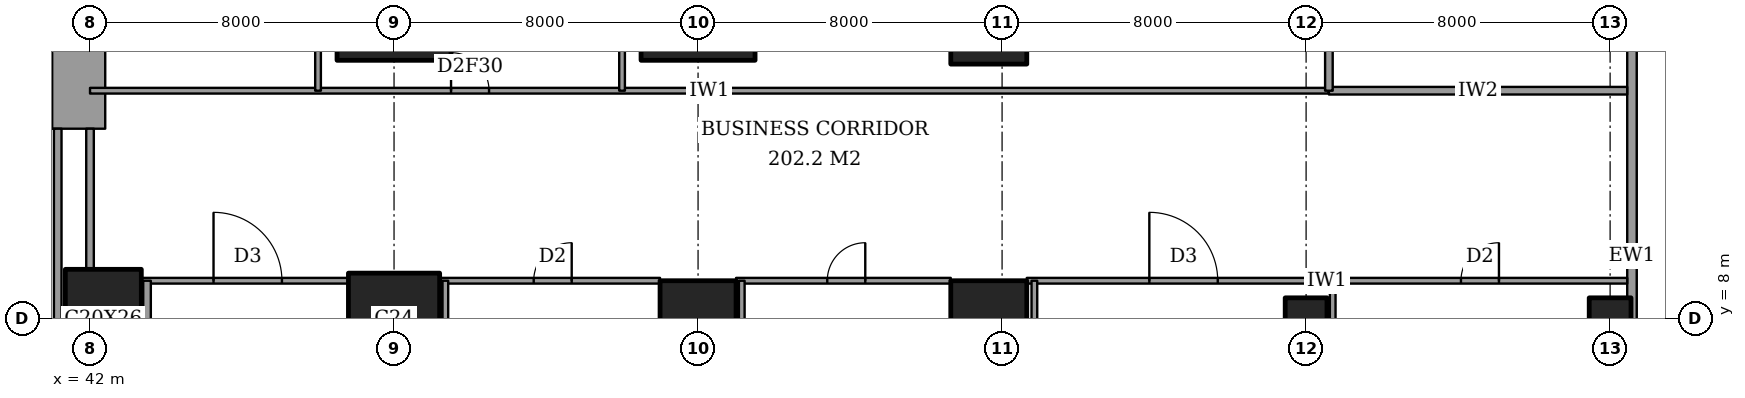
"""IFC4 building model, lengths in metres.
Left out: names, types, materials, properties, quantities, classifications, styles, units other than length and angle.
Written with IfcOpenShell. Run it as: python <this file> out.ifc"""

import sys

from ifc_helpers import new_model, si_unit, direction, frame, frame_2d, origin, origin_2d, place, context, subcontext, project, spatial, rectangle, extrude, element, fill, save


model = new_model("IFC4")
c1 = context("Model", 3, precision=1e-05, world=origin(), true_north=direction((0.0, 1.0)))
c2 = subcontext(c1, "Body", "Model", "MODEL_VIEW")
j1 = project(units=[si_unit("LENGTHUNIT", "METRE"), si_unit("PLANEANGLEUNIT", "RADIAN")], contexts=[c1])
p1 = place(None, origin())
s1 = spatial("IfcSite", under=j1, at=p1, CompositionType="ELEMENT")
p2 = place(p1, origin())
s2 = spatial("IfcBuilding", under=s1, at=p2, CompositionType="ELEMENT")
p3 = place(p2, frame((0.0, 0.0, 6.0)))
s3 = spatial("IfcBuildingStorey", under=s2, at=p3, CompositionType="ELEMENT", Elevation=6.0)
p4 = place(p3, frame((42.35, 8.0, 0.0), z_axis=(0.0, 0.0, 1.0), x_axis=(1.0, 0.0, 0.0)))
e1 = element("IfcColumn", 1, at=p4, inside=s3, PredefinedType="COLUMN", context=c2, shape_type="SweptSolid", body=[
    extrude(rectangle(XDim=2.0, YDim=2.6, at=origin_2d()), origin(), (0.0, 0.0, 1.0), 5.0),
])
p5 = place(p3, frame((50.0, 8.0, 0.0), z_axis=(0.0, 0.0, 1.0), x_axis=(1.0, 0.0, 0.0)))
e2 = element("IfcColumn", 2, at=p5, inside=s3, PredefinedType="COLUMN", context=c2, shape_type="SweptSolid", body=[
    extrude(rectangle(XDim=2.4, YDim=2.4, at=origin_2d()), origin(), (0.0, 0.0, 1.0), 5.0),
])
p6 = place(p3, frame((50.0, 16.0, 0.0), z_axis=(0.0, 0.0, 1.0), x_axis=(1.0, 0.0, 0.0)))
e3 = element("IfcColumn", 3, at=p6, inside=s3, PredefinedType="COLUMN", context=c2, shape_type="SweptSolid", body=[
    extrude(rectangle(XDim=3.0, YDim=2.4, at=origin_2d()), origin(), (0.0, 0.0, 1.0), 5.0),
])
p7 = place(p3, frame((58.0, 8.0, 0.0), z_axis=(0.0, 0.0, 1.0), x_axis=(1.0, 0.0, 0.0)))
e4 = element("IfcColumn", 4, at=p7, inside=s3, PredefinedType="COLUMN", context=c2, shape_type="SweptSolid", body=[
    extrude(rectangle(XDim=2.0, YDim=2.0, at=origin_2d()), origin(), (0.0, 0.0, 1.0), 5.0),
])
p8 = place(p3, frame((58.0, 16.0, 0.0), z_axis=(0.0, 0.0, 1.0), x_axis=(1.0, 0.0, 0.0)))
e5 = element("IfcColumn", 5, at=p8, inside=s3, PredefinedType="COLUMN", context=c2, shape_type="SweptSolid", body=[
    extrude(rectangle(XDim=3.0, YDim=2.4, at=origin_2d()), origin(), (0.0, 0.0, 1.0), 5.0),
])
p9 = place(p3, frame((65.65, 8.0, 0.0), z_axis=(0.0, 0.0, 1.0), x_axis=(1.0, 0.0, 0.0)))
e6 = element("IfcColumn", 6, at=p9, inside=s3, PredefinedType="COLUMN", context=c2, shape_type="SweptSolid", body=[
    extrude(rectangle(XDim=2.0, YDim=2.0, at=origin_2d()), origin(), (0.0, 0.0, 1.0), 5.0),
])
p10 = place(p3, frame((65.65, 16.0, 0.0), z_axis=(0.0, 0.0, 1.0), x_axis=(0.0, 1.0, 0.0)))
e7 = element("IfcColumn", 7, at=p10, inside=s3, PredefinedType="COLUMN", context=c2, shape_type="SweptSolid", body=[
    extrude(rectangle(XDim=2.6, YDim=2.0, at=origin_2d()), origin(), (0.0, 0.0, 1.0), 5.0),
])
for number, where, z_axis, x_axis in (
    (8, (74.0, 8.0, 0.0), (0.0, 0.0, 1.0), (1.0, 0.0, 0.0)),
    (9, (82.0, 8.0, 0.0), (0.0, 0.0, 1.0), (1.0, 0.0, 0.0)),
):
    element("IfcColumn", number, at=place(p3, frame(where, z_axis=z_axis, x_axis=x_axis)), inside=s3, PredefinedType="COLUMN", context=c2, shape_type="SweptSolid", body=[
        extrude(rectangle(XDim=1.1, YDim=1.1, at=origin_2d()), origin(), (0.0, 0.0, 1.0), 5.0),
    ])
p11 = place(p3, frame((41.7, 13.0, 0.0), z_axis=(0.0, 0.0, 1.0), x_axis=(0.0, 1.0, 0.0)))
e10 = element("IfcWall", 10, at=p11, inside=s3, PredefinedType="SHEAR", context=c2, shape_type="SweptSolid", body=[
    extrude(rectangle(XDim=11.85, YDim=1.4, at=frame_2d((5.925, 0.0))), origin(), (0.0, 0.0, 1.0), 5.0),
])
p12 = place(p11, frame((7.5, 0.0, 0.0)))
e11 = element("IfcOpeningElement", 11, at=p12, cuts=e10, PredefinedType="OPENING", context=c2, shape_type="SweptSolid", body=[
    extrude(rectangle(XDim=1.8, YDim=2.4, at=frame_2d((0.9, 1.2))), frame((0.0, 0.71, 0.0), z_axis=(0.0, -1.0, 0.0), x_axis=(1.0, 0.0, 0.0)), (0.0, 0.0, 1.0), 1.42),
])
p13 = place(p3, frame((82.575, -16.575, 0.0), z_axis=(0.0, 0.0, 1.0), x_axis=(0.0, 1.0, 0.0)))
e12 = element("IfcWall", 12, at=p13, inside=s3, PredefinedType="SOLIDWALL", context=c2, shape_type="SweptSolid", body=[
    extrude(rectangle(XDim=52.45, YDim=0.25, at=frame_2d((26.225, 0.0))), origin(), (0.0, 0.0, 1.0), 5.0),
])
p14 = place(p3, frame((43.35, 9.0, 0.0), z_axis=(0.0, 0.0, 1.0), x_axis=(1.0, 0.0, 0.0)))
e13 = element("IfcWall", 13, at=p14, inside=s3, PredefinedType="PARTITIONING", context=c2, shape_type="SweptSolid", body=[
    extrude(rectangle(XDim=5.45, YDim=0.15, at=frame_2d((2.725, 0.0))), origin(), (0.0, 0.0, 1.0), 4.7),
])
p15 = place(p14, frame((1.9, 0.0, 0.0)))
e14 = element("IfcOpeningElement", 14, at=p15, cuts=e13, PredefinedType="OPENING", context=c2, shape_type="SweptSolid", body=[
    extrude(rectangle(XDim=1.8, YDim=2.1, at=frame_2d((0.9, 1.05))), frame((0.0, 0.085, 0.0), z_axis=(0.0, -1.0, 0.0), x_axis=(1.0, 0.0, 0.0)), (0.0, 0.0, 1.0), 0.17),
])
p16 = place(p3, frame((51.2, 9.0, 0.0), z_axis=(0.0, 0.0, 1.0), x_axis=(1.0, 0.0, 0.0)))
e15 = element("IfcWall", 15, at=p16, inside=s3, PredefinedType="PARTITIONING", context=c2, shape_type="SweptSolid", body=[
    extrude(rectangle(XDim=5.8, YDim=0.15, at=frame_2d((2.9, 0.0))), origin(), (0.0, 0.0, 1.0), 4.7),
])
p17 = place(p16, frame((2.475, 0.0, 0.0)))
e16 = element("IfcOpeningElement", 16, at=p17, cuts=e15, PredefinedType="OPENING", context=c2, shape_type="SweptSolid", body=[
    extrude(rectangle(XDim=1.0, YDim=2.1, at=frame_2d((0.5, 1.05))), frame((0.0, 0.085, 0.0), z_axis=(0.0, -1.0, 0.0), x_axis=(1.0, 0.0, 0.0)), (0.0, 0.0, 1.0), 0.17),
])
p18 = place(p3, frame((59.0, 9.0, 0.0), z_axis=(0.0, 0.0, 1.0), x_axis=(1.0, 0.0, 0.0)))
e17 = element("IfcWall", 17, at=p18, inside=s3, PredefinedType="PARTITIONING", context=c2, shape_type="SweptSolid", body=[
    extrude(rectangle(XDim=5.65, YDim=0.15, at=frame_2d((2.825, 0.0))), origin(), (0.0, 0.0, 1.0), 4.7),
])
p19 = place(p18, frame((2.4, 0.0, 0.0)))
e18 = element("IfcOpeningElement", 18, at=p19, cuts=e17, PredefinedType="OPENING", context=c2, shape_type="SweptSolid", body=[
    extrude(rectangle(XDim=1.0, YDim=2.1, at=frame_2d((0.5, 1.05))), frame((0.0, 0.085, 0.0), z_axis=(0.0, -1.0, 0.0), x_axis=(1.0, 0.0, 0.0)), (0.0, 0.0, 1.0), 0.17),
])
p20 = place(p3, frame((66.65, 9.0, 0.0), z_axis=(0.0, 0.0, 1.0), x_axis=(1.0, 0.0, 0.0)))
e19 = element("IfcWall", 19, at=p20, inside=s3, PredefinedType="PARTITIONING", context=c2, shape_type="SweptSolid", body=[
    extrude(rectangle(XDim=15.8, YDim=0.15, at=frame_2d((7.9, 0.0))), origin(), (0.0, 0.0, 1.0), 4.7),
])
p21 = place(p20, frame((3.225, 0.0, 0.0)))
e20 = element("IfcOpeningElement", 20, at=p21, cuts=e19, PredefinedType="OPENING", context=c2, shape_type="SweptSolid", body=[
    extrude(rectangle(XDim=1.8, YDim=2.1, at=frame_2d((0.9, 1.05))), frame((0.0, 0.085, 0.0), z_axis=(0.0, -1.0, 0.0), x_axis=(1.0, 0.0, 0.0)), (0.0, 0.0, 1.0), 0.17),
])
p22 = place(p20, frame((11.425, 0.0, 0.0)))
e21 = element("IfcOpeningElement", 21, at=p22, cuts=e19, PredefinedType="OPENING", context=c2, shape_type="SweptSolid", body=[
    extrude(rectangle(XDim=1.0, YDim=2.1, at=frame_2d((0.5, 1.05))), frame((0.0, 0.085, 0.0), z_axis=(0.0, -1.0, 0.0), x_axis=(1.0, 0.0, 0.0)), (0.0, 0.0, 1.0), 0.17),
])
p23 = place(p3, frame((74.6, 14.0, 0.0), z_axis=(0.0, 0.0, 1.0), x_axis=(1.0, 0.0, 0.0)))
e22 = element("IfcWall", 22, at=p23, inside=s3, PredefinedType="PARTITIONING", context=c2, shape_type="SweptSolid", body=[
    extrude(rectangle(XDim=7.85, YDim=0.2, at=frame_2d((3.925, 0.0))), origin(), (0.0, 0.0, 1.0), 4.7),
])
p24 = place(p3, frame((42.0, 14.0, 0.0), z_axis=(0.0, 0.0, 1.0), x_axis=(1.0, 0.0, 0.0)))
e23 = element("IfcWall", 23, at=p24, inside=s3, PredefinedType="PARTITIONING", context=c2, shape_type="SweptSolid", body=[
    extrude(rectangle(XDim=32.6, YDim=0.15, at=frame_2d((16.3, 0.0))), origin(), (0.0, 0.0, 1.0), 4.7),
])
p25 = place(p24, frame((9.5, 0.0, 0.0)))
e24 = element("IfcOpeningElement", 24, at=p25, cuts=e23, PredefinedType="OPENING", context=c2, shape_type="SweptSolid", body=[
    extrude(rectangle(XDim=1.0, YDim=2.1, at=frame_2d((0.5, 1.05))), frame((0.0, 0.085, 0.0), z_axis=(0.0, -1.0, 0.0), x_axis=(1.0, 0.0, 0.0)), (0.0, 0.0, 1.0), 0.17),
])
p26 = place(p3, frame((41.15, -0.45, 0.0), z_axis=(0.0, 0.0, 1.0), x_axis=(0.0, 1.0, 0.0)))
e25 = element("IfcWall", 25, at=p26, inside=s3, PredefinedType="PARTITIONING", context=c2, shape_type="SweptSolid", body=[
    extrude(rectangle(XDim=13.45, YDim=0.2, at=frame_2d((6.725, 0.0))), origin(), (0.0, 0.0, 1.0), 4.7),
])
p27 = place(p3, frame((42.0, 9.3, 0.0), z_axis=(0.0, 0.0, 1.0), x_axis=(0.0, 1.0, 0.0)))
e26 = element("IfcWall", 26, at=p27, inside=s3, PredefinedType="PARTITIONING", context=c2, shape_type="SweptSolid", body=[
    extrude(rectangle(XDim=3.7, YDim=0.2, at=frame_2d((1.85, 0.0))), origin(), (0.0, 0.0, 1.0), 4.7),
])
p28 = place(p3, frame((43.5, -16.561, 0.0), z_axis=(0.0, 0.0, 1.0), x_axis=(0.0, 1.0, 0.0)))
e27 = element("IfcWall", 27, at=p28, inside=s3, PredefinedType="PARTITIONING", context=c2, shape_type="SweptSolid", body=[
    extrude(rectangle(XDim=25.561, YDim=0.2, at=frame_2d((12.781, 0.0))), origin(), (0.0, 0.0, 1.0), 4.7),
])
p29 = place(p3, frame((48.0, 14.0, 0.0), z_axis=(0.0, 0.0, 1.0), x_axis=(0.0, 1.0, 0.0)))
e28 = element("IfcWall", 28, at=p29, inside=s3, PredefinedType="PARTITIONING", context=c2, shape_type="SweptSolid", body=[
    extrude(rectangle(XDim=14.0, YDim=0.15, at=frame_2d((7.0, 0.0))), origin(), (0.0, 0.0, 1.0), 4.7),
])
p30 = place(p29, frame((10.8, 0.0, 0.0)))
e29 = element("IfcOpeningElement", 29, at=p30, cuts=e28, PredefinedType="OPENING", context=c2, shape_type="SweptSolid", body=[
    extrude(rectangle(XDim=1.0, YDim=2.1, at=frame_2d((0.5, 1.05))), frame((0.0, 0.085, 0.0), z_axis=(0.0, -1.0, 0.0), x_axis=(1.0, 0.0, 0.0)), (0.0, 0.0, 1.0), 0.17),
])
p31 = place(p3, frame((51.35, -16.561, 0.0), z_axis=(0.0, 0.0, 1.0), x_axis=(0.0, 1.0, 0.0)))
e30 = element("IfcWall", 30, at=p31, inside=s3, PredefinedType="PARTITIONING", context=c2, shape_type="SweptSolid", body=[
    extrude(rectangle(XDim=25.561, YDim=0.15, at=frame_2d((12.781, 0.0))), origin(), (0.0, 0.0, 1.0), 4.7),
])
p32 = place(p3, frame((56.0, 14.0, 0.0), z_axis=(0.0, 0.0, 1.0), x_axis=(0.0, 1.0, 0.0)))
e31 = element("IfcWall", 31, at=p32, inside=s3, PredefinedType="PARTITIONING", context=c2, shape_type="SweptSolid", body=[
    extrude(rectangle(XDim=15.4, YDim=0.15, at=frame_2d((7.7, 0.0))), origin(), (0.0, 0.0, 1.0), 4.7),
])
p33 = place(p32, frame((6.8, 0.0, 0.0)))
e32 = element("IfcOpeningElement", 32, at=p33, cuts=e31, PredefinedType="OPENING", context=c2, shape_type="SweptSolid", body=[
    extrude(rectangle(XDim=1.8, YDim=2.1, at=frame_2d((0.9, 1.05))), frame((0.0, 0.085, 0.0), z_axis=(0.0, -1.0, 0.0), x_axis=(1.0, 0.0, 0.0)), (0.0, 0.0, 1.0), 0.17),
])
p34 = place(p3, frame((59.15, -16.561, 0.0), z_axis=(0.0, 0.0, 1.0), x_axis=(0.0, 1.0, 0.0)))
e33 = element("IfcWall", 33, at=p34, inside=s3, PredefinedType="PARTITIONING", context=c2, shape_type="SweptSolid", body=[
    extrude(rectangle(XDim=25.561, YDim=0.15, at=frame_2d((12.781, 0.0))), origin(), (0.0, 0.0, 1.0), 4.7),
])
p35 = place(p3, frame((66.85, 0.3, 0.0), z_axis=(0.0, 0.0, 1.0), x_axis=(0.0, 1.0, 0.0)))
e34 = element("IfcWall", 34, at=p35, inside=s3, PredefinedType="PARTITIONING", context=c2, shape_type="SweptSolid", body=[
    extrude(rectangle(XDim=8.7, YDim=0.15, at=frame_2d((4.35, 0.0))), origin(), (0.0, 0.0, 1.0), 4.7),
])
p36 = place(p3, frame((74.6, 14.0, 0.0), z_axis=(0.0, 0.0, 1.0), x_axis=(0.0, 1.0, 0.0)))
e35 = element("IfcWall", 35, at=p36, inside=s3, PredefinedType="PARTITIONING", context=c2, shape_type="SweptSolid", body=[
    extrude(rectangle(XDim=42.45, YDim=0.2, at=frame_2d((21.225, 0.0))), origin(), (0.0, 0.0, 1.0), 4.7),
])
p37 = place(p3, frame((74.7, -16.561, 0.0), z_axis=(0.0, 0.0, 1.0), x_axis=(0.0, 1.0, 0.0)))
e36 = element("IfcWall", 36, at=p37, inside=s3, PredefinedType="PARTITIONING", context=c2, shape_type="SweptSolid", body=[
    extrude(rectangle(XDim=25.561, YDim=0.15, at=frame_2d((12.781, 0.0))), origin(), (0.0, 0.0, 1.0), 4.7),
])
p38 = place(p25, origin())
e37 = element("IfcDoor", 37, at=p38, inside=s3, OperationType="SINGLE_SWING_RIGHT", PredefinedType="DOOR", context=c2, shape_type="SweptSolid", body=[
    extrude(rectangle(XDim=1.0, YDim=2.1, at=frame_2d((0.5, 1.05))), frame((0.0, 0.025, 0.0), z_axis=(0.0, -1.0, 0.0), x_axis=(1.0, 0.0, 0.0)), (0.0, 0.0, 1.0), 0.05),
])
fill(e24, e37)
p39 = place(p15, origin())
e38 = element("IfcDoor", 38, at=p39, inside=s3, OperationType="DOUBLE_DOOR_DOUBLE_SWING", PredefinedType="DOOR", context=c2, shape_type="SweptSolid", body=[
    extrude(rectangle(XDim=1.8, YDim=2.1, at=frame_2d((0.9, 1.05))), frame((0.0, 0.025, 0.0), z_axis=(0.0, -1.0, 0.0), x_axis=(1.0, 0.0, 0.0)), (0.0, 0.0, 1.0), 0.05),
])
fill(e14, e38)
p40 = place(p17, origin())
e39 = element("IfcDoor", 39, at=p40, inside=s3, OperationType="SINGLE_SWING_LEFT", PredefinedType="DOOR", context=c2, shape_type="SweptSolid", body=[
    extrude(rectangle(XDim=1.0, YDim=2.1, at=frame_2d((0.5, 1.05))), frame((0.0, 0.025, 0.0), z_axis=(0.0, -1.0, 0.0), x_axis=(1.0, 0.0, 0.0)), (0.0, 0.0, 1.0), 0.05),
])
fill(e16, e39)
p41 = place(p19, origin())
e40 = element("IfcDoor", 40, at=p41, inside=s3, OperationType="SINGLE_SWING_LEFT", PredefinedType="DOOR", context=c2, shape_type="SweptSolid", body=[
    extrude(rectangle(XDim=1.0, YDim=2.1, at=frame_2d((0.5, 1.05))), frame((0.0, 0.025, 0.0), z_axis=(0.0, -1.0, 0.0), x_axis=(1.0, 0.0, 0.0)), (0.0, 0.0, 1.0), 0.05),
])
fill(e18, e40)
p42 = place(p21, origin())
e41 = element("IfcDoor", 41, at=p42, inside=s3, OperationType="DOUBLE_DOOR_DOUBLE_SWING", PredefinedType="DOOR", context=c2, shape_type="SweptSolid", body=[
    extrude(rectangle(XDim=1.8, YDim=2.1, at=frame_2d((0.9, 1.05))), frame((0.0, 0.025, 0.0), z_axis=(0.0, -1.0, 0.0), x_axis=(1.0, 0.0, 0.0)), (0.0, 0.0, 1.0), 0.05),
])
fill(e20, e41)
p43 = place(p22, origin())
e42 = element("IfcDoor", 42, at=p43, inside=s3, OperationType="SINGLE_SWING_LEFT", PredefinedType="DOOR", context=c2, shape_type="SweptSolid", body=[
    extrude(rectangle(XDim=1.0, YDim=2.1, at=frame_2d((0.5, 1.05))), frame((0.0, 0.025, 0.0), z_axis=(0.0, -1.0, 0.0), x_axis=(1.0, 0.0, 0.0)), (0.0, 0.0, 1.0), 0.05),
])
fill(e21, e42)
save(model, sys.argv[1])
